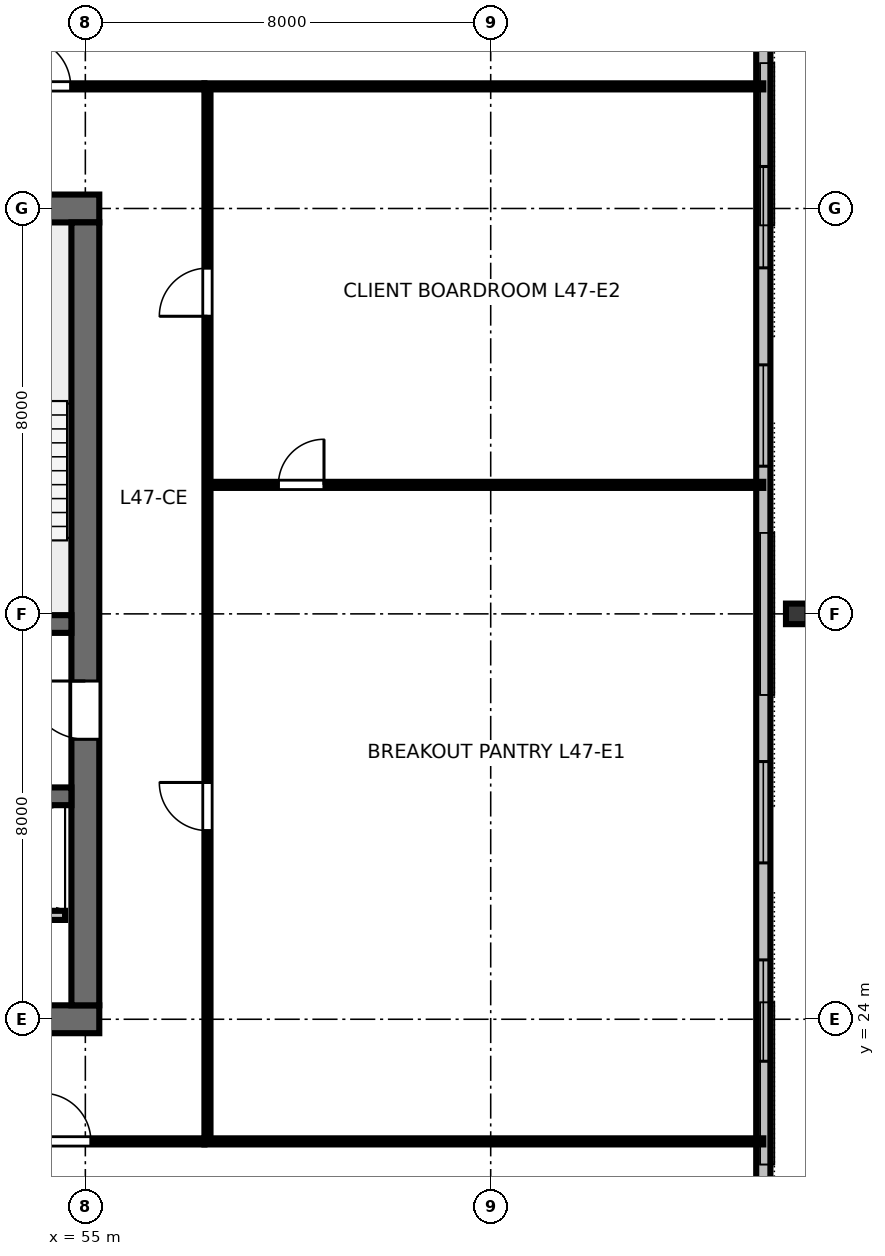
"""IFC4 building model, lengths in metres.
Left out: names, types, materials, properties, quantities, classifications, styles, units other than length and angle.
Written with IfcOpenShell. Run it as: python <this file> out.ifc"""

import sys

from ifc_helpers import new_model, si_unit, direction, frame, frame_2d, origin, origin_2d, place, context, subcontext, project, spatial, rectangle, i_section, extrude, element, fill, save


model = new_model("IFC4")
c1 = context("Model", 3, precision=1e-05, world=origin(), true_north=direction((0.0, 1.0)))
c2 = subcontext(c1, "Body", "Model", "MODEL_VIEW")
j1 = project(units=[si_unit("LENGTHUNIT", "METRE"), si_unit("PLANEANGLEUNIT", "RADIAN")], contexts=[c1])
p1 = place(None, origin())
s1 = spatial("IfcSite", under=j1, at=p1, CompositionType="ELEMENT")
p2 = place(p1, origin())
s2 = spatial("IfcBuilding", under=s1, at=p2, CompositionType="ELEMENT")
p3 = place(p2, frame((0.0, 0.0, 180.6)))
s3 = spatial("IfcBuildingStorey", under=s2, at=p3, CompositionType="ELEMENT", Elevation=180.6)
p4 = place(p3, frame((36.725, 24.0, 0.0), z_axis=(0.0, 0.0, 1.0), x_axis=(1.0, 0.0, 0.0)))
e1 = element("IfcWall", 1, at=p4, inside=s3, PredefinedType="SHEAR", context=c2, shape_type="SweptSolid", body=[
    extrude(rectangle(XDim=18.55, YDim=0.55, at=frame_2d((9.275, 0.0))), origin(), (0.0, 0.0, 1.0), 3.36),
])
p5 = place(p4, frame((13.475, 0.0, 0.0)))
e2 = element("IfcOpeningElement", 2, at=p5, cuts=e1, PredefinedType="OPENING", context=c2, shape_type="SweptSolid", body=[
    extrude(rectangle(XDim=1.6, YDim=2.15, at=frame_2d((0.8, 1.075))), frame((0.0, 0.285, 0.0), z_axis=(0.0, -1.0, 0.0), x_axis=(1.0, 0.0, 0.0)), (0.0, 0.0, 1.0), 0.57),
])
p6 = place(p3, frame((36.725, 40.0, 0.0), z_axis=(0.0, 0.0, 1.0), x_axis=(1.0, 0.0, 0.0)))
e3 = element("IfcWall", 3, at=p6, inside=s3, PredefinedType="SHEAR", context=c2, shape_type="SweptSolid", body=[
    extrude(rectangle(XDim=18.55, YDim=0.55, at=frame_2d((9.275, 0.0))), origin(), (0.0, 0.0, 1.0), 3.36),
])
p7 = place(p6, frame((10.575, 0.0, 0.0)))
e4 = element("IfcOpeningElement", 4, at=p7, cuts=e3, PredefinedType="OPENING", context=c2, shape_type="SweptSolid", body=[
    extrude(rectangle(XDim=1.0, YDim=2.15, at=frame_2d((0.5, 1.075))), frame((0.0, 0.285, 0.0), z_axis=(0.0, -1.0, 0.0), x_axis=(1.0, 0.0, 0.0)), (0.0, 0.0, 1.0), 0.57),
])
p8 = place(p3, frame((55.0, 24.275, 0.0), z_axis=(0.0, 0.0, 1.0), x_axis=(0.0, 1.0, 0.0)))
e5 = element("IfcWall", 5, at=p8, inside=s3, PredefinedType="SHEAR", context=c2, shape_type="SweptSolid", body=[
    extrude(rectangle(XDim=15.45, YDim=0.55, at=frame_2d((7.725, 0.0))), origin(), (0.0, 0.0, 1.0), 3.36),
])
p9 = place(p8, frame((5.25, 0.0, 0.0)))
e6 = element("IfcOpeningElement", 6, at=p9, cuts=e5, PredefinedType="OPENING", context=c2, shape_type="SweptSolid", body=[
    extrude(rectangle(XDim=1.15, YDim=2.15, at=frame_2d((0.575, 1.075))), frame((0.0, 0.285, 0.0), z_axis=(0.0, -1.0, 0.0), x_axis=(1.0, 0.0, 0.0)), (0.0, 0.0, 1.0), 0.57),
])
p10 = place(p3, frame((37.275, 31.8, 0.0), z_axis=(0.0, 0.0, 1.0), x_axis=(1.0, 0.0, 0.0)))
e7 = element("IfcWall", 7, at=p10, inside=s3, PredefinedType="SHEAR", context=c2, shape_type="SweptSolid", body=[
    extrude(rectangle(XDim=17.45, YDim=0.35, at=frame_2d((8.725, 0.0))), origin(), (0.0, 0.0, 1.0), 3.36),
])
p11 = place(p10, frame((0.775, 0.0, 0.0)))
e8 = element("IfcOpeningElement", 8, at=p11, cuts=e7, PredefinedType="OPENING", context=c2, shape_type="SweptSolid", body=[
    extrude(rectangle(XDim=1.1, YDim=2.15, at=frame_2d((0.55, 1.075))), frame((0.0, 0.185, 0.0), z_axis=(0.0, -1.0, 0.0), x_axis=(1.0, 0.0, 0.0)), (0.0, 0.0, 1.0), 0.37),
])
p12 = place(p10, frame((14.675, 0.0, 0.0)))
e9 = element("IfcOpeningElement", 9, at=p12, cuts=e7, PredefinedType="OPENING", context=c2, shape_type="SweptSolid", body=[
    extrude(rectangle(XDim=1.1, YDim=2.15, at=frame_2d((0.55, 1.075))), frame((0.0, 0.185, 0.0), z_axis=(0.0, -1.0, 0.0), x_axis=(1.0, 0.0, 0.0)), (0.0, 0.0, 1.0), 0.37),
])
p13 = place(p3, frame((37.275, 28.4, 0.0), z_axis=(0.0, 0.0, 1.0), x_axis=(1.0, 0.0, 0.0)))
e10 = element("IfcWall", 10, at=p13, inside=s3, PredefinedType="SHEAR", context=c2, shape_type="SweptSolid", body=[
    extrude(rectangle(XDim=17.45, YDim=0.35, at=frame_2d((8.725, 0.0))), origin(), (0.0, 0.0, 1.0), 3.36),
])
p14 = place(p3, frame((69.04, 32.0, 0.0), z_axis=(0.0, 0.0, 1.0), x_axis=(0.0, 1.0, 0.0)))
e11 = element("IfcColumn", 11, at=p14, inside=s3, PredefinedType="COLUMN", context=c2, shape_type="SweptSolid", body=[
    extrude(i_section(OverallWidth=0.406, OverallDepth=0.425, WebThickness=0.033, FlangeThickness=0.052, FilletRadius=0.025, at=origin_2d()), origin(), (0.0, 0.0, 1.0), 3.358),
])
p15 = place(p3, frame((68.38, 17.2, 0.0), z_axis=(0.0, 0.0, 1.0), x_axis=(0.0, 1.0, 0.0)))
e12 = element("IfcWall", 12, at=p15, inside=s3, PredefinedType="STANDARD", context=c2, shape_type="SweptSolid", body=[
    extrude(rectangle(XDim=29.6, YDim=0.28, at=frame_2d((14.8, 0.0))), origin(), (0.0, 0.0, 1.0), 3.36),
])
p16 = place(p15, frame((5.971, 0.0, 0.8)))
e13 = element("IfcOpeningElement", 13, at=p16, cuts=e12, PredefinedType="OPENING", context=c2, shape_type="SweptSolid", body=[
    extrude(rectangle(XDim=2.0, YDim=1.95, at=frame_2d((1.0, 0.975))), frame((0.0, 0.15, 0.0), z_axis=(0.0, -1.0, 0.0), x_axis=(1.0, 0.0, 0.0)), (0.0, 0.0, 1.0), 0.3),
])
p17 = place(p15, frame((9.886, 0.0, 0.8)))
e14 = element("IfcOpeningElement", 14, at=p17, cuts=e12, PredefinedType="OPENING", context=c2, shape_type="SweptSolid", body=[
    extrude(rectangle(XDim=2.0, YDim=1.95, at=frame_2d((1.0, 0.975))), frame((0.0, 0.15, 0.0), z_axis=(0.0, -1.0, 0.0), x_axis=(1.0, 0.0, 0.0)), (0.0, 0.0, 1.0), 0.3),
])
p18 = place(p15, frame((17.714, 0.0, 0.8)))
e15 = element("IfcOpeningElement", 15, at=p18, cuts=e12, PredefinedType="OPENING", context=c2, shape_type="SweptSolid", body=[
    extrude(rectangle(XDim=2.0, YDim=1.95, at=frame_2d((1.0, 0.975))), frame((0.0, 0.15, 0.0), z_axis=(0.0, -1.0, 0.0), x_axis=(1.0, 0.0, 0.0)), (0.0, 0.0, 1.0), 0.3),
])
p19 = place(p15, frame((21.629, 0.0, 0.8)))
e16 = element("IfcOpeningElement", 16, at=p19, cuts=e12, PredefinedType="OPENING", context=c2, shape_type="SweptSolid", body=[
    extrude(rectangle(XDim=2.0, YDim=1.95, at=frame_2d((1.0, 0.975))), frame((0.0, 0.15, 0.0), z_axis=(0.0, -1.0, 0.0), x_axis=(1.0, 0.0, 0.0)), (0.0, 0.0, 1.0), 0.3),
])
p20 = place(p3, frame((47.6, 26.05, 0.0), z_axis=(0.0, 0.0, 1.0), x_axis=(1.0, 0.0, 0.0)))
e17 = element("IfcWall", 17, at=p20, inside=s3, PredefinedType="PARTITIONING", context=c2, shape_type="SweptSolid", body=[
    extrude(rectangle(XDim=7.0, YDim=0.18, at=frame_2d((3.5, 0.0))), origin(), (0.0, 0.0, 1.0), 3.36),
])
p21 = place(p20, frame((1.2, 0.0, 0.0)))
e18 = element("IfcOpeningElement", 18, at=p21, cuts=e17, PredefinedType="OPENING", context=c2, shape_type="SweptSolid", body=[
    extrude(rectangle(XDim=1.05, YDim=2.15, at=frame_2d((0.525, 1.075))), frame((0.0, 0.1, 0.0), z_axis=(0.0, -1.0, 0.0), x_axis=(1.0, 0.0, 0.0)), (0.0, 0.0, 1.0), 0.2),
])
p22 = place(p20, frame((3.4, 0.0, 0.0)))
e19 = element("IfcOpeningElement", 19, at=p22, cuts=e17, PredefinedType="OPENING", context=c2, shape_type="SweptSolid", body=[
    extrude(rectangle(XDim=1.05, YDim=2.15, at=frame_2d((0.525, 1.075))), frame((0.0, 0.1, 0.0), z_axis=(0.0, -1.0, 0.0), x_axis=(1.0, 0.0, 0.0)), (0.0, 0.0, 1.0), 0.2),
])
p23 = place(p3, frame((47.02, 21.59, 0.0), z_axis=(0.0, 0.0, 1.0), x_axis=(1.0, 0.0, 0.0)))
e20 = element("IfcWall", 20, at=p23, inside=s3, PredefinedType="PARTITIONING", context=c2, shape_type="SweptSolid", body=[
    extrude(rectangle(XDim=10.33, YDim=0.12, at=frame_2d((5.165, 0.0))), origin(), (0.0, 0.0, 1.0), 2.64),
])
p24 = place(p23, frame((2.044, 0.0, 0.0)))
e21 = element("IfcOpeningElement", 21, at=p24, cuts=e20, PredefinedType="OPENING", context=c2, shape_type="SweptSolid", body=[
    extrude(rectangle(XDim=0.95, YDim=2.15, at=frame_2d((0.475, 1.075))), frame((0.0, 0.07, 0.0), z_axis=(0.0, -1.0, 0.0), x_axis=(1.0, 0.0, 0.0)), (0.0, 0.0, 1.0), 0.14),
])
p25 = place(p23, frame((7.139, 0.0, 0.0)))
e22 = element("IfcOpeningElement", 22, at=p25, cuts=e20, PredefinedType="OPENING", context=c2, shape_type="SweptSolid", body=[
    extrude(rectangle(XDim=0.95, YDim=2.15, at=frame_2d((0.475, 1.075))), frame((0.0, 0.07, 0.0), z_axis=(0.0, -1.0, 0.0), x_axis=(1.0, 0.0, 0.0)), (0.0, 0.0, 1.0), 0.14),
])
p26 = place(p3, frame((47.02, 42.41, 0.0), z_axis=(0.0, 0.0, 1.0), x_axis=(1.0, 0.0, 0.0)))
e23 = element("IfcWall", 23, at=p26, inside=s3, PredefinedType="PARTITIONING", context=c2, shape_type="SweptSolid", body=[
    extrude(rectangle(XDim=10.33, YDim=0.12, at=frame_2d((5.165, 0.0))), origin(), (0.0, 0.0, 1.0), 2.64),
])
p27 = place(p26, frame((1.709, 0.0, 0.0)))
e24 = element("IfcOpeningElement", 24, at=p27, cuts=e23, PredefinedType="OPENING", context=c2, shape_type="SweptSolid", body=[
    extrude(rectangle(XDim=0.95, YDim=2.15, at=frame_2d((0.475, 1.075))), frame((0.0, 0.07, 0.0), z_axis=(0.0, -1.0, 0.0), x_axis=(1.0, 0.0, 0.0)), (0.0, 0.0, 1.0), 0.14),
])
p28 = place(p26, frame((6.74, 0.0, 0.0)))
e25 = element("IfcOpeningElement", 25, at=p28, cuts=e23, PredefinedType="OPENING", context=c2, shape_type="SweptSolid", body=[
    extrude(rectangle(XDim=0.95, YDim=2.15, at=frame_2d((0.475, 1.075))), frame((0.0, 0.07, 0.0), z_axis=(0.0, -1.0, 0.0), x_axis=(1.0, 0.0, 0.0)), (0.0, 0.0, 1.0), 0.14),
])
p29 = place(p3, frame((57.41, 34.546, 0.0), z_axis=(0.0, 0.0, 1.0), x_axis=(1.0, 0.0, 0.0)))
e26 = element("IfcWall", 26, at=p29, inside=s3, PredefinedType="PARTITIONING", context=c2, shape_type="SweptSolid", body=[
    extrude(rectangle(XDim=10.97, YDim=0.12, at=frame_2d((5.485, 0.0))), origin(), (0.0, 0.0, 1.0), 2.64),
])
p30 = place(p29, frame((1.4, 0.0, 0.0)))
e27 = element("IfcOpeningElement", 27, at=p30, cuts=e26, PredefinedType="OPENING", context=c2, shape_type="SweptSolid", body=[
    extrude(rectangle(XDim=0.9, YDim=2.15, at=frame_2d((0.45, 1.075))), frame((0.0, 0.07, 0.0), z_axis=(0.0, -1.0, 0.0), x_axis=(1.0, 0.0, 0.0)), (0.0, 0.0, 1.0), 0.14),
])
p31 = place(p3, frame((57.41, 21.65, 0.0), z_axis=(0.0, 0.0, 1.0), x_axis=(0.0, 1.0, 0.0)))
e28 = element("IfcWall", 28, at=p31, inside=s3, PredefinedType="PARTITIONING", context=c2, shape_type="SweptSolid", body=[
    extrude(rectangle(XDim=20.7, YDim=0.12, at=frame_2d((10.35, 0.0))), origin(), (0.0, 0.0, 1.0), 2.64),
])
p32 = place(p31, frame((6.073, 0.0, 0.0)))
e29 = element("IfcOpeningElement", 29, at=p32, cuts=e28, PredefinedType="OPENING", context=c2, shape_type="SweptSolid", body=[
    extrude(rectangle(XDim=0.95, YDim=2.15, at=frame_2d((0.475, 1.075))), frame((0.0, 0.07, 0.0), z_axis=(0.0, -1.0, 0.0), x_axis=(1.0, 0.0, 0.0)), (0.0, 0.0, 1.0), 0.14),
])
p33 = place(p31, frame((16.223, 0.0, 0.0)))
e30 = element("IfcOpeningElement", 30, at=p33, cuts=e28, PredefinedType="OPENING", context=c2, shape_type="SweptSolid", body=[
    extrude(rectangle(XDim=0.95, YDim=2.15, at=frame_2d((0.475, 1.075))), frame((0.0, 0.07, 0.0), z_axis=(0.0, -1.0, 0.0), x_axis=(1.0, 0.0, 0.0)), (0.0, 0.0, 1.0), 0.14),
])
for number, where, z_axis, x_axis in (
    (31, (57.35, 21.59, 0.0), (0.0, 0.0, 1.0), (1.0, 0.0, 0.0)),
    (32, (57.35, 42.41, 0.0), (0.0, 0.0, 1.0), (1.0, 0.0, 0.0)),
):
    element("IfcWall", number, at=place(p3, frame(where, z_axis=z_axis, x_axis=x_axis)), inside=s3, PredefinedType="PARTITIONING", context=c2, shape_type="SweptSolid", body=[
        extrude(rectangle(XDim=11.03, YDim=0.12, at=frame_2d((5.515, 0.0))), origin(), (0.0, 0.0, 1.0), 2.64),
    ])
p34 = place(p16, origin())
e33 = element("IfcWindow", 33, at=p34, inside=s3, PartitioningType="SINGLE_PANEL", PredefinedType="WINDOW", context=c2, shape_type="SweptSolid", body=[
    extrude(rectangle(XDim=2.0, YDim=1.95, at=frame_2d((1.0, 0.975))), frame((0.0, 0.03, 0.0), z_axis=(0.0, -1.0, 0.0), x_axis=(1.0, 0.0, 0.0)), (0.0, 0.0, 1.0), 0.06),
])
fill(e13, e33)
p35 = place(p17, origin())
e34 = element("IfcWindow", 34, at=p35, inside=s3, PartitioningType="SINGLE_PANEL", PredefinedType="WINDOW", context=c2, shape_type="SweptSolid", body=[
    extrude(rectangle(XDim=2.0, YDim=1.95, at=frame_2d((1.0, 0.975))), frame((0.0, 0.03, 0.0), z_axis=(0.0, -1.0, 0.0), x_axis=(1.0, 0.0, 0.0)), (0.0, 0.0, 1.0), 0.06),
])
fill(e14, e34)
p36 = place(p18, origin())
e35 = element("IfcWindow", 35, at=p36, inside=s3, PartitioningType="SINGLE_PANEL", PredefinedType="WINDOW", context=c2, shape_type="SweptSolid", body=[
    extrude(rectangle(XDim=2.0, YDim=1.95, at=frame_2d((1.0, 0.975))), frame((0.0, 0.03, 0.0), z_axis=(0.0, -1.0, 0.0), x_axis=(1.0, 0.0, 0.0)), (0.0, 0.0, 1.0), 0.06),
])
fill(e15, e35)
p37 = place(p19, origin())
e36 = element("IfcWindow", 36, at=p37, inside=s3, PartitioningType="SINGLE_PANEL", PredefinedType="WINDOW", context=c2, shape_type="SweptSolid", body=[
    extrude(rectangle(XDim=2.0, YDim=1.95, at=frame_2d((1.0, 0.975))), frame((0.0, 0.03, 0.0), z_axis=(0.0, -1.0, 0.0), x_axis=(1.0, 0.0, 0.0)), (0.0, 0.0, 1.0), 0.06),
])
fill(e16, e36)
p38 = place(p9, origin())
e37 = element("IfcDoor", 37, at=p38, inside=s3, OperationType="SINGLE_SWING_RIGHT", PredefinedType="DOOR", context=c2, shape_type="SweptSolid", body=[
    extrude(rectangle(XDim=1.15, YDim=2.15, at=frame_2d((0.575, 1.075))), frame((0.0, 0.025, 0.0), z_axis=(0.0, -1.0, 0.0), x_axis=(1.0, 0.0, 0.0)), (0.0, 0.0, 1.0), 0.05),
])
fill(e6, e37)
p39 = place(p25, origin())
e38 = element("IfcDoor", 38, at=p39, inside=s3, OperationType="SINGLE_SWING_LEFT", PredefinedType="DOOR", context=c2, shape_type="SweptSolid", body=[
    extrude(rectangle(XDim=0.95, YDim=2.15, at=frame_2d((0.475, 1.075))), frame((0.0, 0.025, 0.0), z_axis=(0.0, -1.0, 0.0), x_axis=(1.0, 0.0, 0.0)), (0.0, 0.0, 1.0), 0.05),
])
fill(e22, e38)
p40 = place(p28, origin())
e39 = element("IfcDoor", 39, at=p40, inside=s3, OperationType="SINGLE_SWING_LEFT", PredefinedType="DOOR", context=c2, shape_type="SweptSolid", body=[
    extrude(rectangle(XDim=0.95, YDim=2.15, at=frame_2d((0.475, 1.075))), frame((0.0, 0.025, 0.0), z_axis=(0.0, -1.0, 0.0), x_axis=(1.0, 0.0, 0.0)), (0.0, 0.0, 1.0), 0.05),
])
fill(e25, e39)
p41 = place(p30, origin())
e40 = element("IfcDoor", 40, at=p41, inside=s3, OperationType="SINGLE_SWING_RIGHT", PredefinedType="DOOR", context=c2, shape_type="SweptSolid", body=[
    extrude(rectangle(XDim=0.9, YDim=2.15, at=frame_2d((0.45, 1.075))), frame((0.0, 0.025, 0.0), z_axis=(0.0, -1.0, 0.0), x_axis=(1.0, 0.0, 0.0)), (0.0, 0.0, 1.0), 0.05),
])
fill(e27, e40)
p42 = place(p32, origin())
e41 = element("IfcDoor", 41, at=p42, inside=s3, OperationType="SINGLE_SWING_RIGHT", PredefinedType="DOOR", context=c2, shape_type="SweptSolid", body=[
    extrude(rectangle(XDim=0.95, YDim=2.15, at=frame_2d((0.475, 1.075))), frame((0.0, 0.025, 0.0), z_axis=(0.0, -1.0, 0.0), x_axis=(1.0, 0.0, 0.0)), (0.0, 0.0, 1.0), 0.05),
])
fill(e29, e41)
p43 = place(p33, origin())
e42 = element("IfcDoor", 42, at=p43, inside=s3, OperationType="SINGLE_SWING_LEFT", PredefinedType="DOOR", context=c2, shape_type="SweptSolid", body=[
    extrude(rectangle(XDim=0.95, YDim=2.15, at=frame_2d((0.475, 1.075))), frame((0.0, 0.025, 0.0), z_axis=(0.0, -1.0, 0.0), x_axis=(1.0, 0.0, 0.0)), (0.0, 0.0, 1.0), 0.05),
])
fill(e30, e42)
save(model, sys.argv[1])
